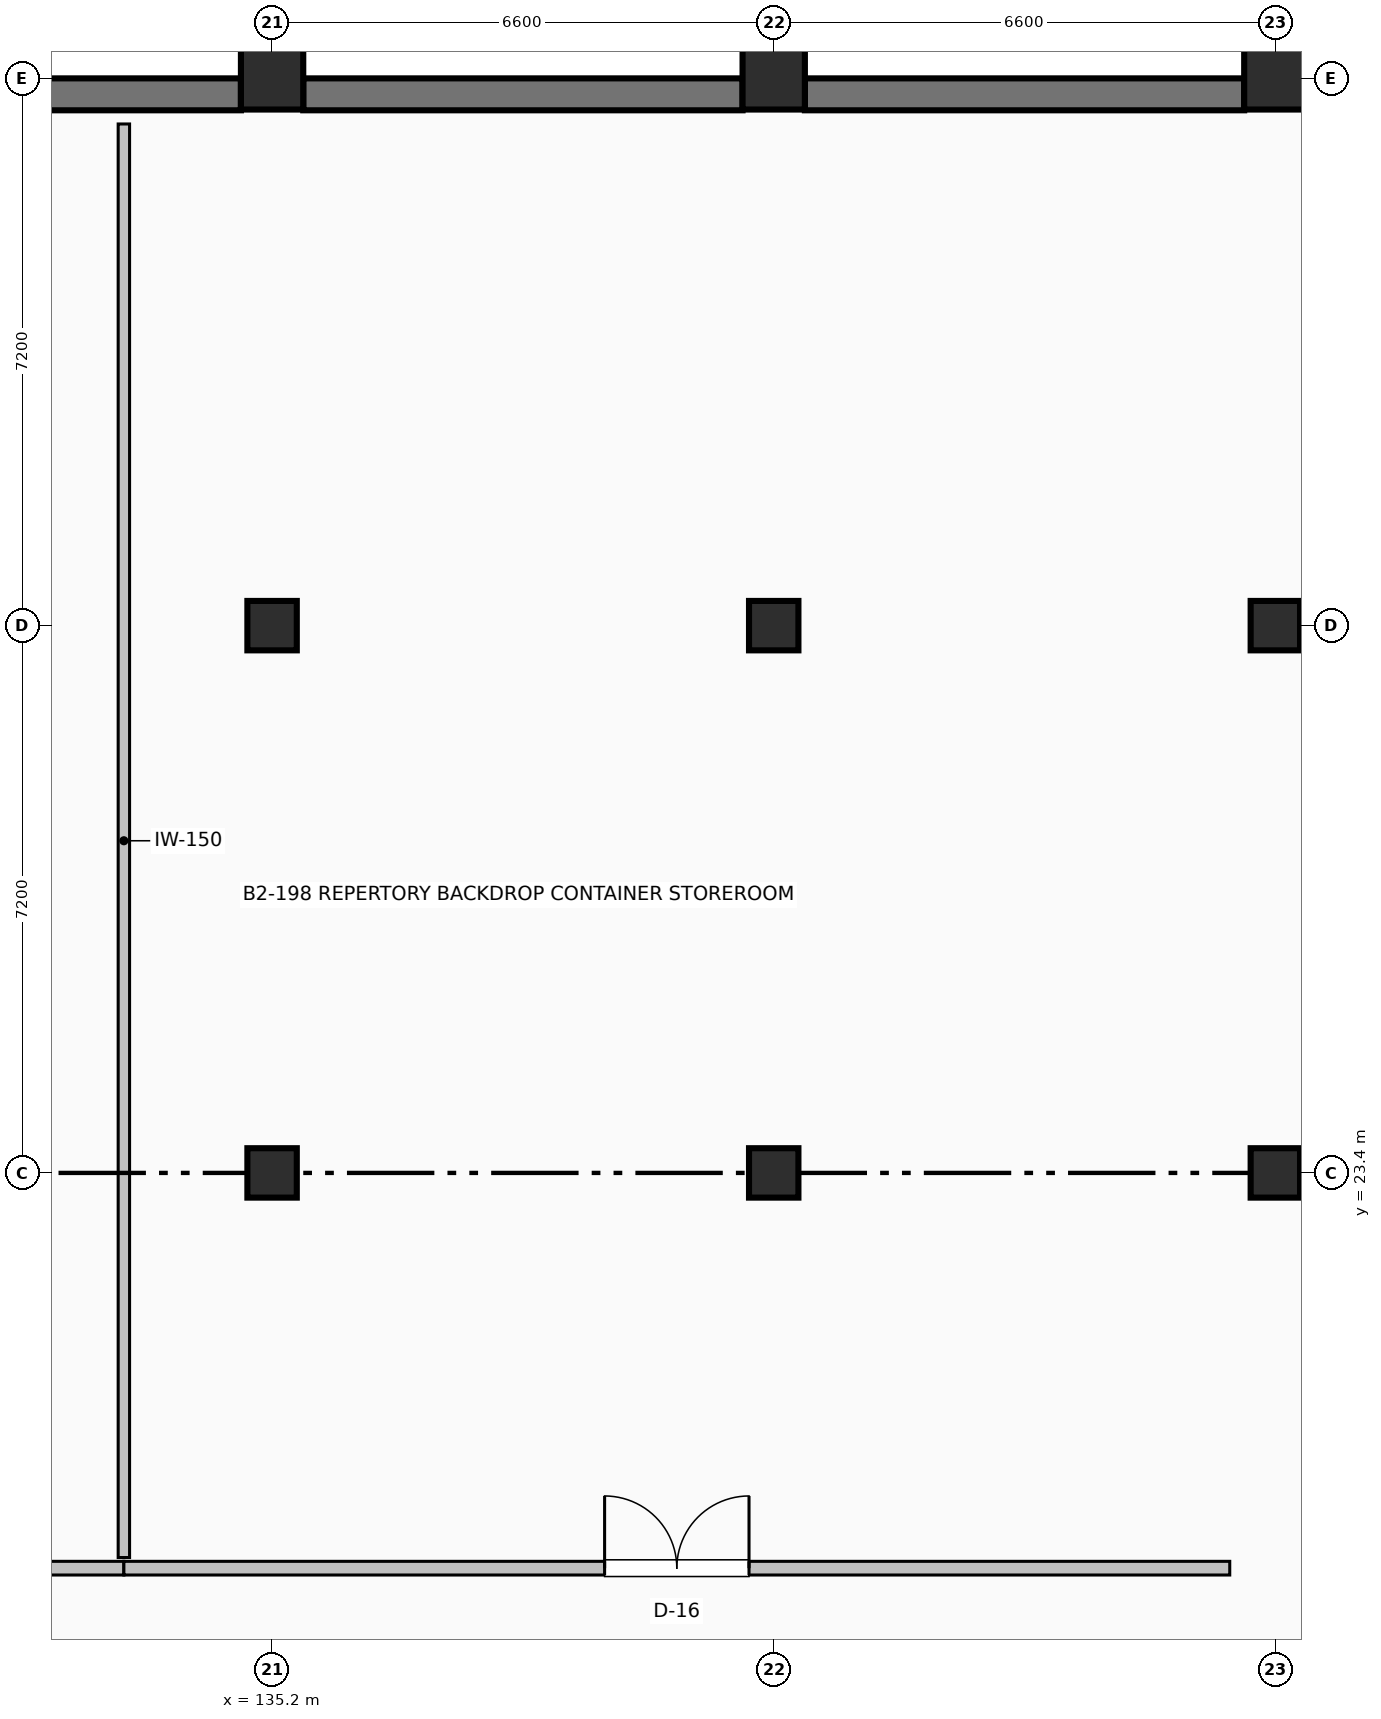
"""IFC4 building model, lengths in metres.
Left out: names, types, materials, properties, quantities, classifications, styles, units other than length and angle.
Written with IfcOpenShell. Run it as: python <this file> out.ifc"""

import sys

from ifc_helpers import new_model, si_unit, direction, frame, frame_2d, origin, origin_2d, place, context, subcontext, project, spatial, rectangle, extrude, element, fill, save


model = new_model("IFC4")
c1 = context("Model", 3, precision=1e-05, world=origin(), true_north=direction((0.0, 1.0)))
c2 = subcontext(c1, "Body", "Model", "MODEL_VIEW")
j1 = project(units=[si_unit("LENGTHUNIT", "METRE"), si_unit("PLANEANGLEUNIT", "RADIAN")], contexts=[c1])
p1 = place(None, origin())
s1 = spatial("IfcSite", under=j1, at=p1, CompositionType="ELEMENT")
p2 = place(p1, origin())
s2 = spatial("IfcBuilding", under=s1, at=p2, CompositionType="ELEMENT")
p3 = place(p2, frame((0.0, 0.0, -9.6)))
s3 = spatial("IfcBuildingStorey", under=s2, at=p3, CompositionType="ELEMENT", Elevation=-9.6)
for number, where, z_axis, x_axis in (
    (1, (135.2, 23.4, 0.0), (0.0, 0.0, 1.0), (1.0, 0.0, 0.0)),
    (2, (135.2, 30.6, 0.0), (0.0, 0.0, 1.0), (1.0, 0.0, 0.0)),
):
    element("IfcColumn", number, at=place(p3, frame(where, z_axis=z_axis, x_axis=x_axis)), inside=s3, PredefinedType="COLUMN", context=c2, shape_type="SweptSolid", body=[
        extrude(rectangle(XDim=0.65, YDim=0.65, at=origin_2d()), origin(), (0.0, 0.0, 1.0), 4.8),
    ])
p4 = place(p3, frame((135.2, 37.8, 0.0), z_axis=(0.0, 0.0, 1.0), x_axis=(1.0, 0.0, 0.0)))
e3 = element("IfcColumn", 3, at=p4, inside=s3, PredefinedType="COLUMN", context=c2, shape_type="SweptSolid", body=[
    extrude(rectangle(XDim=0.82, YDim=0.82, at=origin_2d()), origin(), (0.0, 0.0, 1.0), 4.8),
])
for number, where, z_axis, x_axis in (
    (4, (141.8, 23.4, 0.0), (0.0, 0.0, 1.0), (1.0, 0.0, 0.0)),
    (5, (141.8, 30.6, 0.0), (0.0, 0.0, 1.0), (1.0, 0.0, 0.0)),
):
    element("IfcColumn", number, at=place(p3, frame(where, z_axis=z_axis, x_axis=x_axis)), inside=s3, PredefinedType="COLUMN", context=c2, shape_type="SweptSolid", body=[
        extrude(rectangle(XDim=0.65, YDim=0.65, at=origin_2d()), origin(), (0.0, 0.0, 1.0), 4.8),
    ])
p5 = place(p3, frame((141.8, 37.8, 0.0), z_axis=(0.0, 0.0, 1.0), x_axis=(1.0, 0.0, 0.0)))
e6 = element("IfcColumn", 6, at=p5, inside=s3, PredefinedType="COLUMN", context=c2, shape_type="SweptSolid", body=[
    extrude(rectangle(XDim=0.82, YDim=0.82, at=origin_2d()), origin(), (0.0, 0.0, 1.0), 4.8),
])
for number, where, z_axis, x_axis in (
    (7, (148.4, 23.4, 0.0), (0.0, 0.0, 1.0), (1.0, 0.0, 0.0)),
    (8, (148.4, 30.6, 0.0), (0.0, 0.0, 1.0), (1.0, 0.0, 0.0)),
):
    element("IfcColumn", number, at=place(p3, frame(where, z_axis=z_axis, x_axis=x_axis)), inside=s3, PredefinedType="COLUMN", context=c2, shape_type="SweptSolid", body=[
        extrude(rectangle(XDim=0.65, YDim=0.65, at=origin_2d()), origin(), (0.0, 0.0, 1.0), 4.8),
    ])
p6 = place(p3, frame((148.4, 37.8, 0.0), z_axis=(0.0, 0.0, 1.0), x_axis=(1.0, 0.0, 0.0)))
e9 = element("IfcColumn", 9, at=p6, inside=s3, PredefinedType="COLUMN", context=c2, shape_type="SweptSolid", body=[
    extrude(rectangle(XDim=0.82, YDim=0.82, at=origin_2d()), origin(), (0.0, 0.0, 1.0), 4.8),
])
p7 = place(p3, frame((129.01, 37.59, 0.0), z_axis=(0.0, 0.0, 1.0), x_axis=(1.0, 0.0, 0.0)))
e10 = element("IfcWall", 10, at=p7, inside=s3, PredefinedType="SHEAR", context=c2, shape_type="SweptSolid", body=[
    extrude(rectangle(XDim=5.78, YDim=0.42, at=frame_2d((2.89, 0.0))), origin(), (0.0, 0.0, 1.0), 4.5),
])
p8 = place(p3, frame((135.61, 37.59, 0.0), z_axis=(0.0, 0.0, 1.0), x_axis=(1.0, 0.0, 0.0)))
e11 = element("IfcWall", 11, at=p8, inside=s3, PredefinedType="SHEAR", context=c2, shape_type="SweptSolid", body=[
    extrude(rectangle(XDim=5.78, YDim=0.42, at=frame_2d((2.89, 0.0))), origin(), (0.0, 0.0, 1.0), 4.5),
])
p9 = place(p3, frame((142.21, 37.59, 0.0), z_axis=(0.0, 0.0, 1.0), x_axis=(1.0, 0.0, 0.0)))
e12 = element("IfcWall", 12, at=p9, inside=s3, PredefinedType="SHEAR", context=c2, shape_type="SweptSolid", body=[
    extrude(rectangle(XDim=5.78, YDim=0.42, at=frame_2d((2.89, 0.0))), origin(), (0.0, 0.0, 1.0), 4.5),
])
p10 = place(p3, frame((118.7, 18.2, 0.0), z_axis=(0.0, 0.0, 1.0), x_axis=(1.0, 0.0, 0.0)))
e13 = element("IfcWall", 13, at=p10, inside=s3, PredefinedType="PARTITIONING", context=c2, shape_type="SweptSolid", body=[
    extrude(rectangle(XDim=14.55, YDim=0.18, at=frame_2d((7.275, 0.0))), origin(), (0.0, 0.0, 1.0), 4.492),
])
p11 = place(p10, frame((6.535, 0.0, 0.0)))
e14 = element("IfcOpeningElement", 14, at=p11, cuts=e13, PredefinedType="OPENING", context=c2, shape_type="SweptSolid", body=[
    extrude(rectangle(XDim=1.48, YDim=2.18, at=frame_2d((0.74, 1.09))), frame((0.0, 0.1, 0.0), z_axis=(0.0, -1.0, 0.0), x_axis=(1.0, 0.0, 0.0)), (0.0, 0.0, 1.0), 0.2),
])
p12 = place(p3, frame((133.25, 18.34, 0.0), z_axis=(0.0, 0.0, 1.0), x_axis=(0.0, 1.0, 0.0)))
e15 = element("IfcWall", 15, at=p12, inside=s3, PredefinedType="PARTITIONING", context=c2, shape_type="SweptSolid", body=[
    extrude(rectangle(XDim=18.86, YDim=0.15, at=frame_2d((9.43, 0.0))), origin(), (0.0, 0.0, 1.0), 4.492),
])
p13 = place(p3, frame((133.25, 18.2, 0.0), z_axis=(0.0, 0.0, 1.0), x_axis=(1.0, 0.0, 0.0)))
e16 = element("IfcWall", 16, at=p13, inside=s3, PredefinedType="PARTITIONING", context=c2, shape_type="SweptSolid", body=[
    extrude(rectangle(XDim=14.55, YDim=0.18, at=frame_2d((7.275, 0.0))), origin(), (0.0, 0.0, 1.0), 4.492),
])
p14 = place(p13, frame((6.325, 0.0, 0.0)))
e17 = element("IfcOpeningElement", 17, at=p14, cuts=e16, PredefinedType="OPENING", context=c2, shape_type="SweptSolid", body=[
    extrude(rectangle(XDim=1.9, YDim=2.26, at=frame_2d((0.95, 1.13))), frame((0.0, 0.1, 0.0), z_axis=(0.0, -1.0, 0.0), x_axis=(1.0, 0.0, 0.0)), (0.0, 0.0, 1.0), 0.2),
])
p15 = place(p14, origin())
e18 = element("IfcDoor", 18, at=p15, inside=s3, OperationType="DOUBLE_DOOR_SINGLE_SWING", PredefinedType="DOOR", context=c2, shape_type="SweptSolid", body=[
    extrude(rectangle(XDim=1.9, YDim=2.26, at=frame_2d((0.95, 1.13))), frame((0.0, 0.025, 0.0), z_axis=(0.0, -1.0, 0.0), x_axis=(1.0, 0.0, 0.0)), (0.0, 0.0, 1.0), 0.05),
])
fill(e17, e18)
save(model, sys.argv[1])
